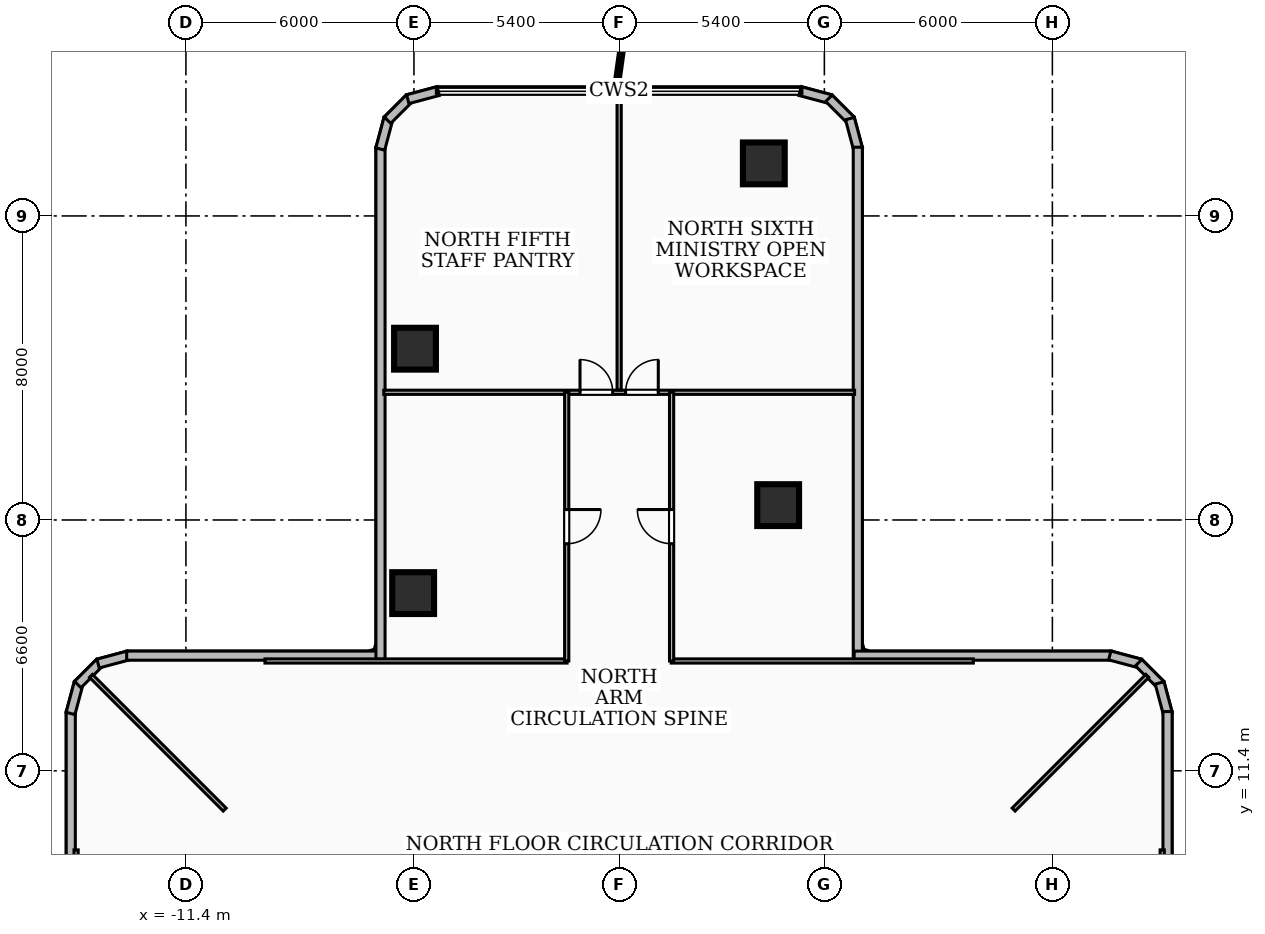
"""IFC4 building model, lengths in metres.
Left out: names, types, materials, properties, quantities, classifications, styles, units other than length and angle.
Written with IfcOpenShell. Run it as: python <this file> out.ifc"""

import sys

from ifc_helpers import new_model, si_unit, direction, frame, frame_2d, origin, origin_2d, place, context, subcontext, project, spatial, rectangle, extrude, element, fill, save


model = new_model("IFC4")
c1 = context("Model", 3, precision=1e-05, world=origin(), true_north=direction((0.0, 1.0)))
c2 = subcontext(c1, "Body", "Model", "MODEL_VIEW")
j1 = project(units=[si_unit("LENGTHUNIT", "METRE"), si_unit("PLANEANGLEUNIT", "RADIAN")], contexts=[c1])
p1 = place(None, origin())
s1 = spatial("IfcSite", under=j1, at=p1, CompositionType="ELEMENT")
p2 = place(p1, origin())
s2 = spatial("IfcBuilding", under=s1, at=p2, CompositionType="ELEMENT")
p3 = place(p2, frame((0.0, 0.0, 31.68)))
s3 = spatial("IfcBuildingStorey", under=s2, at=p3, CompositionType="ELEMENT", Elevation=31.68)
for number, where, z_axis, x_axis in (
    (1, (4.184, 18.391, 0.0), (0.0, 0.0, 1.0), (1.0, 0.0, 0.0)),
    (2, (-5.421, 16.076, 0.0), (0.0, 0.0, 1.0), (1.0, 0.0, 0.0)),
    (3, (3.807, 27.383, 0.0), (0.0, 0.0, 1.0), (1.0, 0.0, 0.0)),
    (4, (-5.372, 22.507, 0.0), (0.0, 0.0, 1.0), (1.0, 0.0, 0.0)),
):
    element("IfcColumn", number, at=place(p3, frame(where, z_axis=z_axis, x_axis=x_axis)), inside=s3, PredefinedType="COLUMN", context=c2, shape_type="SweptSolid", body=[
        extrude(rectangle(XDim=1.1, YDim=1.1, at=origin_2d()), origin(), (0.0, 0.0, 1.0), 3.6),
    ])
p4 = place(p3, frame((-14.43, 6.184, 0.0), z_axis=(0.0, 0.0, 1.0), x_axis=(0.0, 1.0, 0.0)))
e5 = element("IfcWall", 5, at=p4, inside=s3, PredefinedType="SOLIDWALL", context=c2, shape_type="SweptSolid", body=[
    extrude(rectangle(XDim=6.775, YDim=0.24, at=frame_2d((3.387, 0.0))), origin(), (0.0, 0.0, 1.0), 3.34),
])
p5 = place(p3, frame((-14.436, 12.91, 0.0), z_axis=(0.0, 0.0, 1.0), x_axis=(0.257937227116, 0.966161677396, 0.0)))
e6 = element("IfcWall", 6, at=p5, inside=s3, PredefinedType="SOLIDWALL", context=c2, shape_type="SweptSolid", body=[
    extrude(rectangle(XDim=0.83, YDim=0.24, at=frame_2d((0.415, 0.0))), origin(), (0.0, 0.0, 1.0), 3.34),
])
p6 = place(p3, frame((-14.246, 13.67, 0.0), z_axis=(0.0, 0.0, 1.0), x_axis=(0.707106781187, 0.707106781187, 0.0)))
e7 = element("IfcWall", 7, at=p6, inside=s3, PredefinedType="SOLIDWALL", context=c2, shape_type="SweptSolid", body=[
    extrude(rectangle(XDim=0.815, YDim=0.24, at=frame_2d((0.407, 0.0))), origin(), (0.0, 0.0, 1.0), 3.34),
])
p7 = place(p3, frame((-13.712, 14.222, 0.0), z_axis=(0.0, 0.0, 1.0), x_axis=(0.966161677396, 0.257937227116, 0.0)))
e8 = element("IfcWall", 8, at=p7, inside=s3, PredefinedType="SOLIDWALL", context=c2, shape_type="SweptSolid", body=[
    extrude(rectangle(XDim=0.83, YDim=0.24, at=frame_2d((0.415, 0.0))), origin(), (0.0, 0.0, 1.0), 3.34),
])
p8 = place(p3, frame((-12.959, 14.43, 0.0), z_axis=(0.0, 0.0, 1.0), x_axis=(1.0, 0.0, 0.0)))
e9 = element("IfcWall", 9, at=p8, inside=s3, PredefinedType="SOLIDWALL", context=c2, shape_type="SweptSolid", body=[
    extrude(rectangle(XDim=6.775, YDim=0.24, at=frame_2d((3.387, 0.0))), origin(), (0.0, 0.0, 1.0), 2.421),
])
p9 = place(p3, frame((-6.28, 14.334, 0.0), z_axis=(0.0, 0.0, 1.0), x_axis=(0.0, 1.0, 0.0)))
e10 = element("IfcWall", 10, at=p9, inside=s3, PredefinedType="SOLIDWALL", context=c2, shape_type="SweptSolid", body=[
    extrude(rectangle(XDim=13.475, YDim=0.24, at=frame_2d((6.738, 0.0))), origin(), (0.0, 0.0, 1.0), 2.421),
])
p10 = place(p3, frame((-6.286, 27.76, 0.0), z_axis=(0.0, 0.0, 1.0), x_axis=(0.25766265056, 0.966234939601, 0.0)))
e11 = element("IfcWall", 11, at=p10, inside=s3, PredefinedType="SOLIDWALL", context=c2, shape_type="SweptSolid", body=[
    extrude(rectangle(XDim=0.83, YDim=0.24, at=frame_2d((0.415, 0.0))), origin(), (0.0, 0.0, 1.0), 3.34),
])
p11 = place(p3, frame((-6.096, 28.52, 0.0), z_axis=(0.0, 0.0, 1.0), x_axis=(0.707106781187, 0.707106781187, 0.0)))
e12 = element("IfcWall", 12, at=p11, inside=s3, PredefinedType="SOLIDWALL", context=c2, shape_type="SweptSolid", body=[
    extrude(rectangle(XDim=0.814, YDim=0.24, at=frame_2d((0.407, 0.0))), origin(), (0.0, 0.0, 1.0), 3.34),
])
for number, where, z_axis, x_axis in (
    (13, (-5.562, 29.072, 0.0), (0.0, 0.0, 1.0), (0.966, 0.258, 0.0)),
    (14, (4.76, 29.286, 0.0), (0.0, 0.0, 1.0), (0.966, -0.258, 0.0)),
):
    element("IfcWall", number, at=place(p3, frame(where, z_axis=z_axis, x_axis=x_axis)), inside=s3, PredefinedType="SOLIDWALL", context=c2, shape_type="SweptSolid", body=[
        extrude(rectangle(XDim=0.83, YDim=0.24, at=frame_2d((0.415, 0.0))), origin(), (0.0, 0.0, 1.0), 3.34),
    ])
p12 = place(p3, frame((5.52, 29.096, 0.0), z_axis=(0.0, 0.0, 1.0), x_axis=(0.707106781187, -0.707106781187, 0.0)))
e15 = element("IfcWall", 15, at=p12, inside=s3, PredefinedType="SOLIDWALL", context=c2, shape_type="SweptSolid", body=[
    extrude(rectangle(XDim=0.814, YDim=0.24, at=frame_2d((0.407, 0.0))), origin(), (0.0, 0.0, 1.0), 3.34),
])
p13 = place(p3, frame((6.072, 28.562, 0.0), z_axis=(0.0, 0.0, 1.0), x_axis=(0.25766265056, -0.966234939601, 0.0)))
e16 = element("IfcWall", 16, at=p13, inside=s3, PredefinedType="SOLIDWALL", context=c2, shape_type="SweptSolid", body=[
    extrude(rectangle(XDim=0.83, YDim=0.24, at=frame_2d((0.415, 0.0))), origin(), (0.0, 0.0, 1.0), 3.34),
])
p14 = place(p3, frame((6.28, 27.809, 0.0), z_axis=(0.0, 0.0, 1.0), x_axis=(0.0, -1.0, 0.0)))
e17 = element("IfcWall", 17, at=p14, inside=s3, PredefinedType="SOLIDWALL", context=c2, shape_type="SweptSolid", body=[
    extrude(rectangle(XDim=13.475, YDim=0.24, at=frame_2d((6.738, 0.0))), origin(), (0.0, 0.0, 1.0), 2.644),
])
p15 = place(p3, frame((6.184, 14.43, 0.0), z_axis=(0.0, 0.0, 1.0), x_axis=(1.0, 0.0, 0.0)))
e18 = element("IfcWall", 18, at=p15, inside=s3, PredefinedType="SOLIDWALL", context=c2, shape_type="SweptSolid", body=[
    extrude(rectangle(XDim=6.775, YDim=0.24, at=frame_2d((3.387, 0.0))), origin(), (0.0, 0.0, 1.0), 2.644),
])
p16 = place(p3, frame((12.91, 14.436, 0.0), z_axis=(0.0, 0.0, 1.0), x_axis=(0.966161677396, -0.257937227116, 0.0)))
e19 = element("IfcWall", 19, at=p16, inside=s3, PredefinedType="SOLIDWALL", context=c2, shape_type="SweptSolid", body=[
    extrude(rectangle(XDim=0.83, YDim=0.24, at=frame_2d((0.415, 0.0))), origin(), (0.0, 0.0, 1.0), 3.34),
])
p17 = place(p3, frame((13.67, 14.246, 0.0), z_axis=(0.0, 0.0, 1.0), x_axis=(0.707106781187, -0.707106781187, 0.0)))
e20 = element("IfcWall", 20, at=p17, inside=s3, PredefinedType="SOLIDWALL", context=c2, shape_type="SweptSolid", body=[
    extrude(rectangle(XDim=0.815, YDim=0.24, at=frame_2d((0.407, 0.0))), origin(), (0.0, 0.0, 1.0), 3.34),
])
p18 = place(p3, frame((14.222, 13.712, 0.0), z_axis=(0.0, 0.0, 1.0), x_axis=(0.257937227116, -0.966161677396, 0.0)))
e21 = element("IfcWall", 21, at=p18, inside=s3, PredefinedType="SOLIDWALL", context=c2, shape_type="SweptSolid", body=[
    extrude(rectangle(XDim=0.83, YDim=0.24, at=frame_2d((0.415, 0.0))), origin(), (0.0, 0.0, 1.0), 3.34),
])
p19 = place(p3, frame((14.43, 12.959, 0.0), z_axis=(0.0, 0.0, 1.0), x_axis=(0.0, -1.0, 0.0)))
e22 = element("IfcWall", 22, at=p19, inside=s3, PredefinedType="SOLIDWALL", context=c2, shape_type="SweptSolid", body=[
    extrude(rectangle(XDim=6.775, YDim=0.24, at=frame_2d((3.387, 0.0))), origin(), (0.0, 0.0, 1.0), 2.644),
])
p20 = place(p3, frame((10.38, 10.38, 0.0), z_axis=(0.0, 0.0, 1.0), x_axis=(0.707106781187, 0.707106781187, 0.0)))
e23 = element("IfcWall", 23, at=p20, inside=s3, PredefinedType="PARTITIONING", context=c2, shape_type="SweptSolid", body=[
    extrude(rectangle(XDim=4.975, YDim=0.11, at=frame_2d((2.488, 0.0))), origin(), (0.0, 0.0, 1.0), 2.644),
])
p21 = place(p3, frame((-10.38, 10.38, 0.0), z_axis=(0.0, 0.0, 1.0), x_axis=(-0.707106781187, 0.707106781187, 0.0)))
e24 = element("IfcWall", 24, at=p21, inside=s3, PredefinedType="PARTITIONING", context=c2, shape_type="SweptSolid", body=[
    extrude(rectangle(XDim=4.975, YDim=0.11, at=frame_2d((2.488, 0.0))), origin(), (0.0, 0.0, 1.0), 3.34),
])
for number, where, z_axis, x_axis in (
    (25, (14.29, 1.37, 0.0), (0.0, 0.0, 1.0), (0.0, 1.0, 0.0)),
    (26, (-1.37, 14.29, 0.0), (0.0, 0.0, 1.0), (-1.0, 0.0, 0.0)),
    (27, (9.32, 14.29, 0.0), (0.0, 0.0, 1.0), (-1.0, 0.0, 0.0)),
):
    element("IfcWall", number, at=place(p3, frame(where, z_axis=z_axis, x_axis=x_axis)), inside=s3, PredefinedType="PARTITIONING", context=c2, shape_type="SweptSolid", body=[
        extrude(rectangle(XDim=7.95, YDim=0.11, at=frame_2d((3.975, 0.0))), origin(), (0.0, 0.0, 1.0), 2.421),
    ])
p22 = place(p3, frame((-1.38, 21.36, 0.0), z_axis=(0.0, 0.0, 1.0), x_axis=(0.0, -1.0, 0.0)))
e28 = element("IfcWall", 28, at=p22, inside=s3, PredefinedType="PARTITIONING", context=c2, shape_type="SweptSolid", body=[
    extrude(rectangle(XDim=7.07, YDim=0.11, at=frame_2d((3.535, 0.0))), origin(), (0.0, 0.0, 1.0), 2.869),
])
p23 = place(p22, frame((3.085, 0.0, 0.0)))
e29 = element("IfcOpeningElement", 29, at=p23, cuts=e28, PredefinedType="OPENING", context=c2, shape_type="SweptSolid", body=[
    extrude(rectangle(XDim=0.9, YDim=2.06, at=frame_2d((0.45, 1.03))), frame((0.0, 0.065, 0.0), z_axis=(0.0, -1.0, 0.0), x_axis=(1.0, 0.0, 0.0)), (0.0, 0.0, 1.0), 0.13),
])
p24 = place(p3, frame((1.38, 14.29, 0.0), z_axis=(0.0, 0.0, 1.0), x_axis=(0.0, 1.0, 0.0)))
e30 = element("IfcWall", 30, at=p24, inside=s3, PredefinedType="PARTITIONING", context=c2, shape_type="SweptSolid", body=[
    extrude(rectangle(XDim=7.07, YDim=0.11, at=frame_2d((3.535, 0.0))), origin(), (0.0, 0.0, 1.0), 2.869),
])
p25 = place(p24, frame((3.085, 0.0, 0.0)))
e31 = element("IfcOpeningElement", 31, at=p25, cuts=e30, PredefinedType="OPENING", context=c2, shape_type="SweptSolid", body=[
    extrude(rectangle(XDim=0.9, YDim=2.06, at=frame_2d((0.45, 1.03))), frame((0.0, 0.065, 0.0), z_axis=(0.0, -1.0, 0.0), x_axis=(1.0, 0.0, 0.0)), (0.0, 0.0, 1.0), 0.13),
])
p26 = place(p3, frame((0.0, 21.42, 0.0), z_axis=(0.0, 0.0, 1.0), x_axis=(0.0, 1.0, 0.0)))
e32 = element("IfcWall", 32, at=p26, inside=s3, PredefinedType="PARTITIONING", context=c2, shape_type="SweptSolid", body=[
    extrude(rectangle(XDim=7.775, YDim=0.11, at=frame_2d((3.888, 0.0))), origin(), (0.0, 0.0, 1.0), 2.72),
])
p27 = place(p3, frame((-6.195, 21.36, 0.0), z_axis=(0.0, 0.0, 1.0), x_axis=(1.0, 0.0, 0.0)))
e33 = element("IfcWall", 33, at=p27, inside=s3, PredefinedType="PARTITIONING", context=c2, shape_type="SweptSolid", body=[
    extrude(rectangle(XDim=12.39, YDim=0.11, at=frame_2d((6.195, 0.0))), origin(), (0.0, 0.0, 1.0), 2.421),
])
p28 = place(p27, frame((6.365, 0.0, 0.0)))
e34 = element("IfcOpeningElement", 34, at=p28, cuts=e33, PredefinedType="OPENING", context=c2, shape_type="SweptSolid", body=[
    extrude(rectangle(XDim=0.86, YDim=2.04, at=frame_2d((0.43, 1.02))), frame((0.0, 0.065, 0.0), z_axis=(0.0, -1.0, 0.0), x_axis=(1.0, 0.0, 0.0)), (0.0, 0.0, 1.0), 0.13),
])
p29 = place(p27, frame((5.165, 0.0, 0.0)))
e35 = element("IfcOpeningElement", 35, at=p29, cuts=e33, PredefinedType="OPENING", context=c2, shape_type="SweptSolid", body=[
    extrude(rectangle(XDim=0.86, YDim=2.04, at=frame_2d((0.43, 1.02))), frame((0.0, 0.065, 0.0), z_axis=(0.0, -1.0, 0.0), x_axis=(1.0, 0.0, 0.0)), (0.0, 0.0, 1.0), 0.13),
])
p30 = place(p3, frame((-14.29, 9.32, 0.0), z_axis=(0.0, 0.0, 1.0), x_axis=(0.0, -1.0, 0.0)))
e36 = element("IfcWall", 36, at=p30, inside=s3, PredefinedType="PARTITIONING", context=c2, shape_type="SweptSolid", body=[
    extrude(rectangle(XDim=7.95, YDim=0.11, at=frame_2d((3.975, 0.0))), origin(), (0.0, 0.0, 1.0), 2.421),
])
p31 = place(p23, origin())
e37 = element("IfcDoor", 37, at=p31, inside=s3, OperationType="SINGLE_SWING_LEFT", PredefinedType="DOOR", context=c2, shape_type="SweptSolid", body=[
    extrude(rectangle(XDim=0.9, YDim=2.06, at=frame_2d((0.45, 1.03))), frame((0.0, 0.025, 0.0), z_axis=(0.0, -1.0, 0.0), x_axis=(1.0, 0.0, 0.0)), (0.0, 0.0, 1.0), 0.05),
])
fill(e29, e37)
p32 = place(p25, origin())
e38 = element("IfcDoor", 38, at=p32, inside=s3, OperationType="SINGLE_SWING_RIGHT", PredefinedType="DOOR", context=c2, shape_type="SweptSolid", body=[
    extrude(rectangle(XDim=0.9, YDim=2.06, at=frame_2d((0.45, 1.03))), frame((0.0, 0.025, 0.0), z_axis=(0.0, -1.0, 0.0), x_axis=(1.0, 0.0, 0.0)), (0.0, 0.0, 1.0), 0.05),
])
fill(e31, e38)
p33 = place(p28, origin())
e39 = element("IfcDoor", 39, at=p33, inside=s3, OperationType="SINGLE_SWING_RIGHT", PredefinedType="DOOR", context=c2, shape_type="SweptSolid", body=[
    extrude(rectangle(XDim=0.86, YDim=2.04, at=frame_2d((0.43, 1.02))), frame((0.0, 0.025, 0.0), z_axis=(0.0, -1.0, 0.0), x_axis=(1.0, 0.0, 0.0)), (0.0, 0.0, 1.0), 0.05),
])
fill(e34, e39)
p34 = place(p29, origin())
e40 = element("IfcDoor", 40, at=p34, inside=s3, OperationType="SINGLE_SWING_LEFT", PredefinedType="DOOR", context=c2, shape_type="SweptSolid", body=[
    extrude(rectangle(XDim=0.86, YDim=2.04, at=frame_2d((0.43, 1.02))), frame((0.0, 0.025, 0.0), z_axis=(0.0, -1.0, 0.0), x_axis=(1.0, 0.0, 0.0)), (0.0, 0.0, 1.0), 0.05),
])
fill(e35, e40)
save(model, sys.argv[1])
